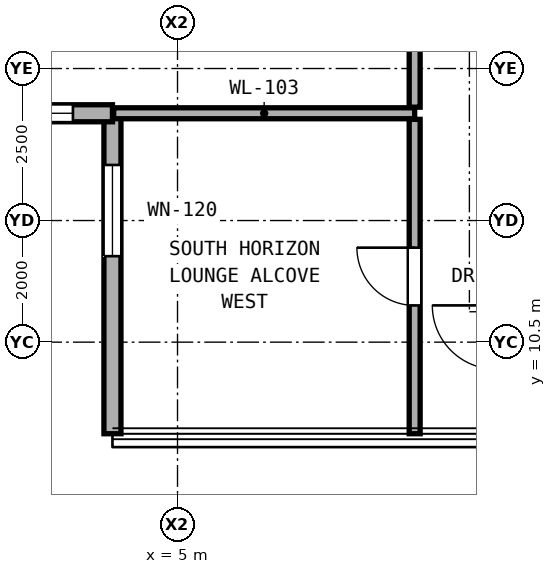
"""IFC4 building model, lengths in metres.
Left out: names, types, materials, properties, quantities, classifications, styles, units other than length and angle.
Written with IfcOpenShell. Run it as: python <this file> out.ifc"""

import sys

from ifc_helpers import new_model, si_unit, direction, frame, frame_2d, origin, place, context, subcontext, project, spatial, rectangle, extrude, element, fill, save


model = new_model("IFC4")
c1 = context("Model", 3, precision=1e-05, world=origin(), true_north=direction((0.0, 1.0)))
c2 = subcontext(c1, "Body", "Model", "MODEL_VIEW")
j1 = project(units=[si_unit("LENGTHUNIT", "METRE"), si_unit("PLANEANGLEUNIT", "RADIAN")], contexts=[c1])
p1 = place(None, origin())
s1 = spatial("IfcSite", under=j1, at=p1, CompositionType="ELEMENT")
p2 = place(p1, origin())
s2 = spatial("IfcBuilding", under=s1, at=p2, CompositionType="ELEMENT")
p3 = place(p2, frame((0.0, 0.0, 141.2)))
s3 = spatial("IfcBuildingStorey", under=s2, at=p3, CompositionType="ELEMENT", Elevation=141.2)
p4 = place(p3, frame((3.93, 14.264, 0.0), z_axis=(0.0, 0.0, 1.0), x_axis=(0.0, -1.0, 0.0)))
e1 = element("IfcWall", 1, at=p4, inside=s3, PredefinedType="SOLIDWALL", context=c2, shape_type="SweptSolid", body=[
    extrude(rectangle(XDim=5.27, YDim=0.28, at=frame_2d((2.635, 0.0))), origin(), (0.0, 0.0, 1.0), 3.06),
])
p5 = place(p4, frame((0.85, 0.0, 0.81)))
e2 = element("IfcOpeningElement", 2, at=p5, cuts=e1, PredefinedType="OPENING", context=c2, shape_type="SweptSolid", body=[
    extrude(rectangle(XDim=1.5, YDim=2.1, at=frame_2d((0.75, 1.05))), frame((0.0, 0.15, 0.0), z_axis=(0.0, -1.0, 0.0), x_axis=(1.0, 0.0, 0.0)), (0.0, 0.0, 1.0), 0.3),
])
p6 = place(p3, frame((-1.34, 14.264, 0.0), z_axis=(0.0, 0.0, 1.0), x_axis=(1.0, 0.0, 0.0)))
e3 = element("IfcWall", 3, at=p6, inside=s3, PredefinedType="SOLIDWALL", context=c2, shape_type="SweptSolid", body=[
    extrude(rectangle(XDim=5.27, YDim=0.28, at=frame_2d((2.635, 0.0))), origin(), (0.0, 0.0, 1.0), 3.06),
])
p7 = place(p6, frame((3.52, 0.0, 0.85)))
e4 = element("IfcOpeningElement", 4, at=p7, cuts=e3, PredefinedType="OPENING", context=c2, shape_type="SweptSolid", body=[
    extrude(rectangle(XDim=1.1, YDim=2.0, at=frame_2d((0.55, 1.0))), frame((0.0, 0.15, 0.0), z_axis=(0.0, -1.0, 0.0), x_axis=(1.0, 0.0, 0.0)), (0.0, 0.0, 1.0), 0.3),
])
p8 = place(p3, frame((3.95, 14.264, 0.0), z_axis=(0.0, 0.0, 1.0), x_axis=(1.0, 0.0, 0.0)))
e5 = element("IfcWall", 5, at=p8, inside=s3, PredefinedType="PARTITIONING", context=c2, shape_type="SweptSolid", body=[
    extrude(rectangle(XDim=4.95, YDim=0.18, at=frame_2d((2.475, 0.0))), origin(), (0.0, 0.0, 1.0), 3.08),
])
p9 = place(p3, frame((8.9, 8.994, 0.0), z_axis=(0.0, 0.0, 1.0), x_axis=(0.0, 1.0, 0.0)))
e6 = element("IfcWall", 6, at=p9, inside=s3, PredefinedType="PARTITIONING", context=c2, shape_type="SweptSolid", body=[
    extrude(rectangle(XDim=5.17, YDim=0.18, at=frame_2d((2.585, 0.0))), origin(), (0.0, 0.0, 1.0), 3.08),
])
p10 = place(p9, frame((2.11, 0.0, 0.0)))
e7 = element("IfcOpeningElement", 7, at=p10, cuts=e6, PredefinedType="OPENING", context=c2, shape_type="SweptSolid", body=[
    extrude(rectangle(XDim=0.95, YDim=2.15, at=frame_2d((0.475, 1.075))), frame((0.0, 0.1, 0.0), z_axis=(0.0, -1.0, 0.0), x_axis=(1.0, 0.0, 0.0)), (0.0, 0.0, 1.0), 0.2),
])
p11 = place(p3, frame((8.9, 14.364, 0.0), z_axis=(0.0, 0.0, 1.0), x_axis=(0.0, 1.0, 0.0)))
e8 = element("IfcWall", 8, at=p11, inside=s3, PredefinedType="PARTITIONING", context=c2, shape_type="SweptSolid", body=[
    extrude(rectangle(XDim=4.298, YDim=0.18, at=frame_2d((2.149, 0.0))), origin(), (0.0, 0.0, 1.0), 2.456),
])
p12 = place(p11, frame((2.224, 0.0, 0.0)))
e9 = element("IfcOpeningElement", 9, at=p12, cuts=e8, PredefinedType="OPENING", context=c2, shape_type="SweptSolid", body=[
    extrude(rectangle(XDim=1.05, YDim=2.2, at=frame_2d((0.525, 1.1))), frame((0.0, 0.1, 0.0), z_axis=(0.0, -1.0, 0.0), x_axis=(1.0, 0.0, 0.0)), (0.0, 0.0, 1.0), 0.2),
])
p13 = place(p5, origin())
e10 = element("IfcWindow", 10, at=p13, inside=s3, PartitioningType="SINGLE_PANEL", PredefinedType="WINDOW", context=c2, shape_type="SweptSolid", body=[
    extrude(rectangle(XDim=1.5, YDim=2.1, at=frame_2d((0.75, 1.05))), frame((0.0, 0.03, 0.0), z_axis=(0.0, -1.0, 0.0), x_axis=(1.0, 0.0, 0.0)), (0.0, 0.0, 1.0), 0.06),
])
fill(e2, e10)
p14 = place(p7, origin())
e11 = element("IfcWindow", 11, at=p14, inside=s3, PartitioningType="SINGLE_PANEL", PredefinedType="WINDOW", context=c2, shape_type="SweptSolid", body=[
    extrude(rectangle(XDim=1.1, YDim=2.0, at=frame_2d((0.55, 1.0))), frame((0.0, 0.03, 0.0), z_axis=(0.0, -1.0, 0.0), x_axis=(1.0, 0.0, 0.0)), (0.0, 0.0, 1.0), 0.06),
])
fill(e4, e11)
p15 = place(p10, origin())
e12 = element("IfcDoor", 12, at=p15, inside=s3, OperationType="SINGLE_SWING_RIGHT", PredefinedType="DOOR", context=c2, shape_type="SweptSolid", body=[
    extrude(rectangle(XDim=0.95, YDim=2.15, at=frame_2d((0.475, 1.075))), frame((0.0, 0.025, 0.0), z_axis=(0.0, -1.0, 0.0), x_axis=(1.0, 0.0, 0.0)), (0.0, 0.0, 1.0), 0.05),
])
fill(e7, e12)
save(model, sys.argv[1])
